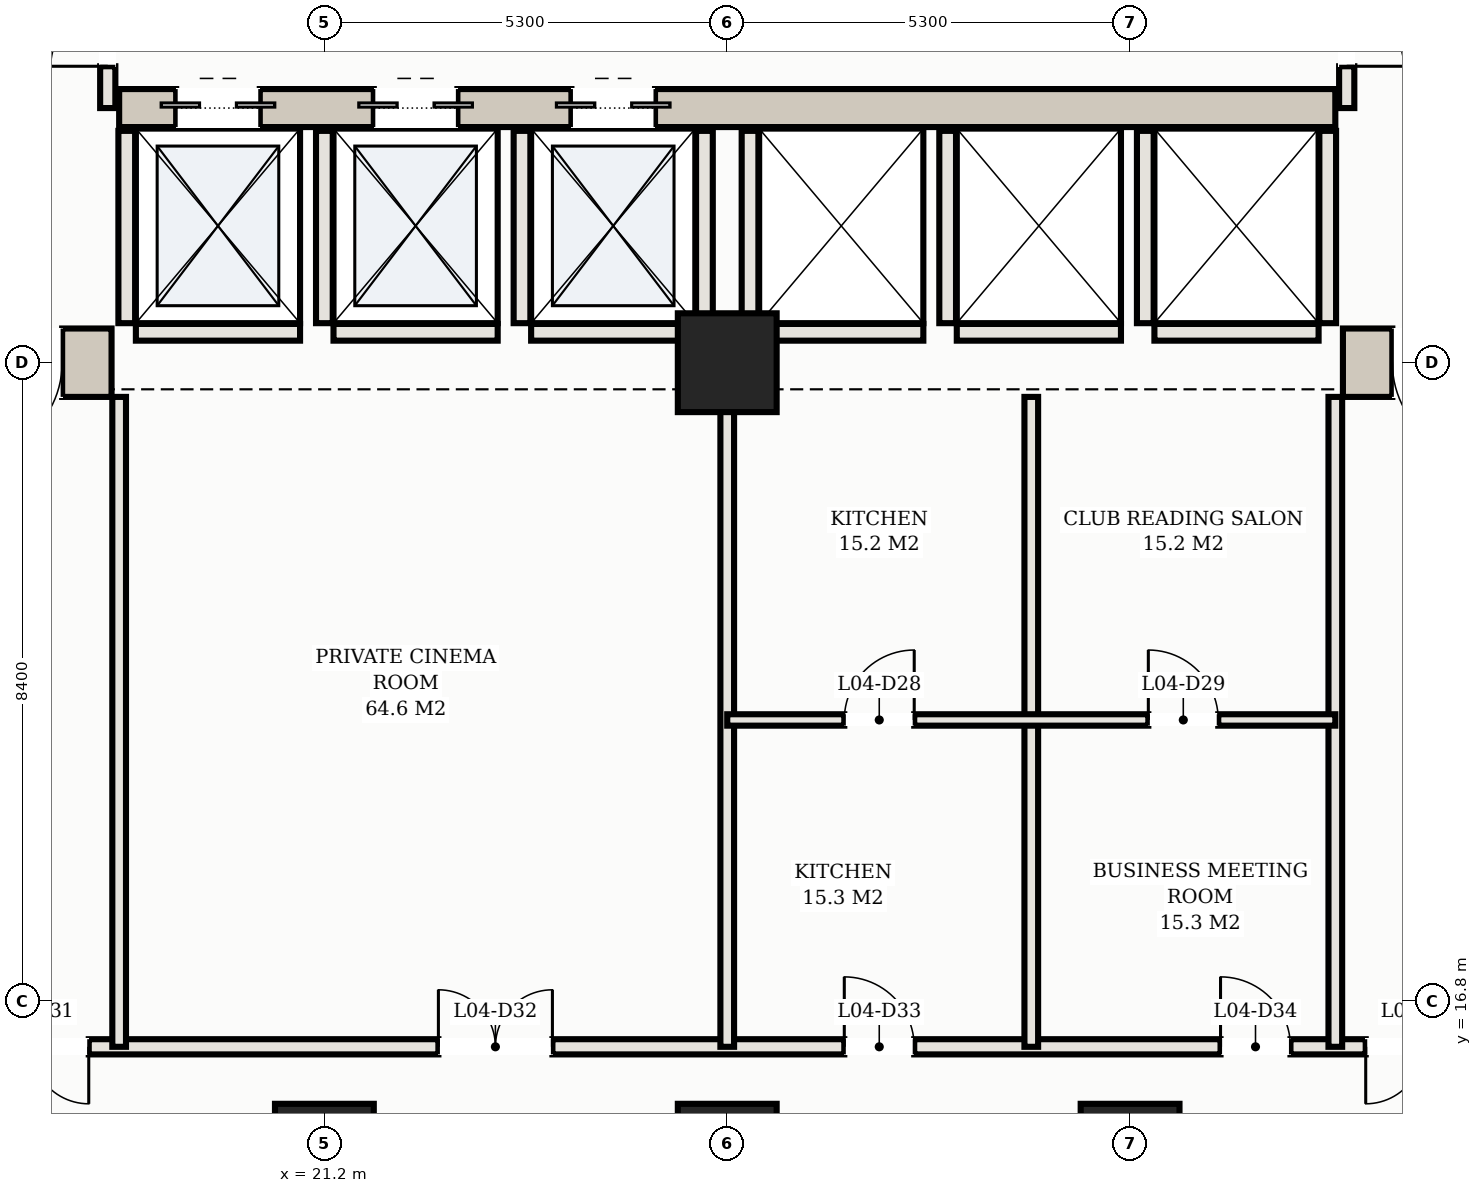
"""IFC4 building model, lengths in metres.
Left out: names, types, materials, properties, quantities, classifications, styles, units other than length and angle.
Written with IfcOpenShell. Run it as: python <this file> out.ifc"""

import sys

from ifc_helpers import new_model, si_unit, direction, frame, frame_2d, origin, origin_2d, place, context, subcontext, project, spatial, rectangle, hollow_rectangle, extrude, element, fill, save


model = new_model("IFC4")
c1 = context("Model", 3, precision=1e-05, world=origin(), true_north=direction((0.0, 1.0)))
c2 = subcontext(c1, "Body", "Model", "MODEL_VIEW")
j1 = project(units=[si_unit("LENGTHUNIT", "METRE"), si_unit("PLANEANGLEUNIT", "RADIAN")], contexts=[c1])
p1 = place(None, origin())
s1 = spatial("IfcSite", under=j1, at=p1, CompositionType="ELEMENT")
p2 = place(p1, origin())
s2 = spatial("IfcBuilding", under=s1, at=p2, CompositionType="ELEMENT")
p3 = place(p2, frame((0.0, 0.0, 19.0)))
s3 = spatial("IfcBuildingStorey", under=s2, at=p3, CompositionType="ELEMENT", Elevation=19.0)
p4 = place(p3, frame((10.15, 25.2, 0.0), z_axis=(0.0, 0.0, 1.0), x_axis=(1.0, 0.0, 0.0)))
e1 = element("IfcWall", 1, at=p4, inside=s3, PredefinedType="SHEAR", context=c2, shape_type="SweptSolid", body=[
    extrude(rectangle(XDim=8.25, YDim=0.9, at=frame_2d((4.125, 0.0))), origin(), (0.0, 0.0, 1.0), 4.86),
])
p5 = place(p4, frame((6.35, 0.0, 0.0)))
e2 = element("IfcOpeningElement", 2, at=p5, cuts=e1, PredefinedType="OPENING", context=c2, shape_type="SweptSolid", body=[
    extrude(rectangle(XDim=1.25, YDim=2.2, at=frame_2d((0.625, 1.1))), frame((0.0, 0.46, 0.0), z_axis=(0.0, -1.0, 0.0), x_axis=(1.0, 0.0, 0.0)), (0.0, 0.0, 1.0), 0.92),
])
p6 = place(p3, frame((34.6, 25.2, 0.0), z_axis=(0.0, 0.0, 1.0), x_axis=(1.0, 0.0, 0.0)))
e3 = element("IfcWall", 3, at=p6, inside=s3, PredefinedType="SHEAR", context=c2, shape_type="SweptSolid", body=[
    extrude(rectangle(XDim=8.25, YDim=0.9, at=frame_2d((4.125, 0.0))), origin(), (0.0, 0.0, 1.0), 4.86),
])
p7 = place(p6, frame((0.65, 0.0, 0.0)))
e4 = element("IfcOpeningElement", 4, at=p7, cuts=e3, PredefinedType="OPENING", context=c2, shape_type="SweptSolid", body=[
    extrude(rectangle(XDim=1.25, YDim=2.2, at=frame_2d((0.625, 1.1))), frame((0.0, 0.46, 0.0), z_axis=(0.0, -1.0, 0.0), x_axis=(1.0, 0.0, 0.0)), (0.0, 0.0, 1.0), 0.92),
])
p8 = place(p3, frame((18.5, 28.55, 0.0), z_axis=(0.0, 0.0, 1.0), x_axis=(1.0, 0.0, 0.0)))
e5 = element("IfcWall", 5, at=p8, inside=s3, PredefinedType="SHEAR", context=c2, shape_type="SweptSolid", body=[
    extrude(rectangle(XDim=16.0, YDim=0.5, at=frame_2d((8.0, 0.0))), origin(), (0.0, 0.0, 1.0), 4.86),
])
p9 = place(p8, frame((0.75, 0.0, 0.0)))
e6 = element("IfcOpeningElement", 6, at=p9, cuts=e5, PredefinedType="OPENING", context=c2, shape_type="SweptSolid", body=[
    extrude(rectangle(XDim=1.1, YDim=2.15, at=frame_2d((0.55, 1.075))), frame((0.0, 0.26, 0.0), z_axis=(0.0, -1.0, 0.0), x_axis=(1.0, 0.0, 0.0)), (0.0, 0.0, 1.0), 0.52),
])
p10 = place(p8, frame((3.35, 0.0, 0.0)))
e7 = element("IfcOpeningElement", 7, at=p10, cuts=e5, PredefinedType="OPENING", context=c2, shape_type="SweptSolid", body=[
    extrude(rectangle(XDim=1.1, YDim=2.15, at=frame_2d((0.55, 1.075))), frame((0.0, 0.26, 0.0), z_axis=(0.0, -1.0, 0.0), x_axis=(1.0, 0.0, 0.0)), (0.0, 0.0, 1.0), 0.52),
])
p11 = place(p8, frame((5.95, 0.0, 0.0)))
e8 = element("IfcOpeningElement", 8, at=p11, cuts=e5, PredefinedType="OPENING", context=c2, shape_type="SweptSolid", body=[
    extrude(rectangle(XDim=1.1, YDim=2.15, at=frame_2d((0.55, 1.075))), frame((0.0, 0.26, 0.0), z_axis=(0.0, -1.0, 0.0), x_axis=(1.0, 0.0, 0.0)), (0.0, 0.0, 1.0), 0.52),
])
for number, where, z_axis, x_axis in (
    (9, (26.5, 25.2, 0.0), (0.0, 0.0, 1.0), (1.0, 0.0, 0.0)),
    (10, (21.2, 14.8, 0.0), (0.0, 0.0, 1.0), (1.0, 0.0, 0.0)),
    (11, (26.5, 14.8, 0.0), (0.0, 0.0, 1.0), (1.0, 0.0, 0.0)),
    (12, (31.8, 14.8, 0.0), (0.0, 0.0, 1.0), (1.0, 0.0, 0.0)),
):
    element("IfcColumn", number, at=place(p3, frame(where, z_axis=z_axis, x_axis=x_axis)), inside=s3, PredefinedType="COLUMN", context=c2, shape_type="SweptSolid", body=[
        extrude(hollow_rectangle(XDim=1.3, YDim=1.3, WallThickness=0.042, at=origin_2d()), origin(), (0.0, 0.0, 1.0), 5.2),
    ])
p12 = place(p3, frame((18.6, 25.72, 0.0), z_axis=(0.0, 0.0, 1.0), x_axis=(0.0, 1.0, 0.0)))
e13 = element("IfcWall", 13, at=p12, inside=s3, PredefinedType="SOLIDWALL", context=c2, shape_type="SweptSolid", body=[
    extrude(rectangle(XDim=2.53, YDim=0.22, at=frame_2d((1.265, 0.0))), origin(), (0.0, 0.0, 1.0), 4.86),
])
p13 = place(p3, frame((18.72, 25.6, 0.0), z_axis=(0.0, 0.0, 1.0), x_axis=(1.0, 0.0, 0.0)))
e14 = element("IfcWall", 14, at=p13, inside=s3, PredefinedType="SOLIDWALL", context=c2, shape_type="SweptSolid", body=[
    extrude(rectangle(XDim=2.16, YDim=0.22, at=frame_2d((1.08, 0.0))), origin(), (0.0, 0.0, 1.0), 4.86),
])
p14 = place(p3, frame((21.2, 25.72, 0.0), z_axis=(0.0, 0.0, 1.0), x_axis=(0.0, 1.0, 0.0)))
e15 = element("IfcWall", 15, at=p14, inside=s3, PredefinedType="SOLIDWALL", context=c2, shape_type="SweptSolid", body=[
    extrude(rectangle(XDim=2.53, YDim=0.22, at=frame_2d((1.265, 0.0))), origin(), (0.0, 0.0, 1.0), 4.86),
])
p15 = place(p3, frame((21.32, 25.6, 0.0), z_axis=(0.0, 0.0, 1.0), x_axis=(1.0, 0.0, 0.0)))
e16 = element("IfcWall", 16, at=p15, inside=s3, PredefinedType="SOLIDWALL", context=c2, shape_type="SweptSolid", body=[
    extrude(rectangle(XDim=2.16, YDim=0.22, at=frame_2d((1.08, 0.0))), origin(), (0.0, 0.0, 1.0), 4.86),
])
for number, where, z_axis, x_axis in (
    (17, (23.8, 25.72, 0.0), (0.0, 0.0, 1.0), (0.0, 1.0, 0.0)),
    (18, (26.2, 25.72, 0.0), (0.0, 0.0, 1.0), (0.0, 1.0, 0.0)),
):
    element("IfcWall", number, at=place(p3, frame(where, z_axis=z_axis, x_axis=x_axis)), inside=s3, PredefinedType="SOLIDWALL", context=c2, shape_type="SweptSolid", body=[
        extrude(rectangle(XDim=2.53, YDim=0.22, at=frame_2d((1.265, 0.0))), origin(), (0.0, 0.0, 1.0), 4.86),
    ])
p16 = place(p3, frame((23.92, 25.6, 0.0), z_axis=(0.0, 0.0, 1.0), x_axis=(1.0, 0.0, 0.0)))
e19 = element("IfcWall", 19, at=p16, inside=s3, PredefinedType="SOLIDWALL", context=c2, shape_type="SweptSolid", body=[
    extrude(rectangle(XDim=2.16, YDim=0.22, at=frame_2d((1.08, 0.0))), origin(), (0.0, 0.0, 1.0), 4.86),
])
p17 = place(p3, frame((26.8, 25.72, 0.0), z_axis=(0.0, 0.0, 1.0), x_axis=(0.0, 1.0, 0.0)))
e20 = element("IfcWall", 20, at=p17, inside=s3, PredefinedType="SOLIDWALL", context=c2, shape_type="SweptSolid", body=[
    extrude(rectangle(XDim=2.53, YDim=0.22, at=frame_2d((1.265, 0.0))), origin(), (0.0, 0.0, 1.0), 4.86),
])
p18 = place(p3, frame((26.92, 25.6, 0.0), z_axis=(0.0, 0.0, 1.0), x_axis=(1.0, 0.0, 0.0)))
e21 = element("IfcWall", 21, at=p18, inside=s3, PredefinedType="SOLIDWALL", context=c2, shape_type="SweptSolid", body=[
    extrude(rectangle(XDim=2.16, YDim=0.22, at=frame_2d((1.08, 0.0))), origin(), (0.0, 0.0, 1.0), 4.86),
])
p19 = place(p3, frame((29.4, 25.72, 0.0), z_axis=(0.0, 0.0, 1.0), x_axis=(0.0, 1.0, 0.0)))
e22 = element("IfcWall", 22, at=p19, inside=s3, PredefinedType="SOLIDWALL", context=c2, shape_type="SweptSolid", body=[
    extrude(rectangle(XDim=2.53, YDim=0.22, at=frame_2d((1.265, 0.0))), origin(), (0.0, 0.0, 1.0), 4.86),
])
p20 = place(p3, frame((29.52, 25.6, 0.0), z_axis=(0.0, 0.0, 1.0), x_axis=(1.0, 0.0, 0.0)))
e23 = element("IfcWall", 23, at=p20, inside=s3, PredefinedType="SOLIDWALL", context=c2, shape_type="SweptSolid", body=[
    extrude(rectangle(XDim=2.16, YDim=0.22, at=frame_2d((1.08, 0.0))), origin(), (0.0, 0.0, 1.0), 4.86),
])
for number, where, z_axis, x_axis in (
    (24, (32.0, 25.72, 0.0), (0.0, 0.0, 1.0), (0.0, 1.0, 0.0)),
    (25, (34.4, 25.72, 0.0), (0.0, 0.0, 1.0), (0.0, 1.0, 0.0)),
):
    element("IfcWall", number, at=place(p3, frame(where, z_axis=z_axis, x_axis=x_axis)), inside=s3, PredefinedType="SOLIDWALL", context=c2, shape_type="SweptSolid", body=[
        extrude(rectangle(XDim=2.53, YDim=0.22, at=frame_2d((1.265, 0.0))), origin(), (0.0, 0.0, 1.0), 4.86),
    ])
p21 = place(p3, frame((32.12, 25.6, 0.0), z_axis=(0.0, 0.0, 1.0), x_axis=(1.0, 0.0, 0.0)))
e26 = element("IfcWall", 26, at=p21, inside=s3, PredefinedType="SOLIDWALL", context=c2, shape_type="SweptSolid", body=[
    extrude(rectangle(XDim=2.16, YDim=0.22, at=frame_2d((1.08, 0.0))), origin(), (0.0, 0.0, 1.0), 4.86),
])
p22 = place(p3, frame((18.35, 28.55, 0.0), z_axis=(0.0, 0.0, 1.0), x_axis=(0.0, 1.0, 0.0)))
e27 = element("IfcWall", 27, at=p22, inside=s3, PredefinedType="PARTITIONING", context=c2, shape_type="SweptSolid", body=[
    extrude(rectangle(XDim=2.6, YDim=0.2, at=frame_2d((1.3, 0.0))), origin(), (0.0, 0.0, 1.0), 4.86),
])
p23 = place(p22, frame((0.55, 0.0, 0.0)))
e28 = element("IfcOpeningElement", 28, at=p23, cuts=e27, PredefinedType="OPENING", context=c2, shape_type="SweptSolid", body=[
    extrude(rectangle(XDim=1.5, YDim=2.25, at=frame_2d((0.75, 1.125))), frame((0.0, 0.11, 0.0), z_axis=(0.0, -1.0, 0.0), x_axis=(1.0, 0.0, 0.0)), (0.0, 0.0, 1.0), 0.22),
])
p24 = place(p3, frame((34.65, 28.55, 0.0), z_axis=(0.0, 0.0, 1.0), x_axis=(0.0, 1.0, 0.0)))
e29 = element("IfcWall", 29, at=p24, inside=s3, PredefinedType="PARTITIONING", context=c2, shape_type="SweptSolid", body=[
    extrude(rectangle(XDim=2.6, YDim=0.2, at=frame_2d((1.3, 0.0))), origin(), (0.0, 0.0, 1.0), 4.86),
])
p25 = place(p24, frame((0.55, 0.0, 0.0)))
e30 = element("IfcOpeningElement", 30, at=p25, cuts=e29, PredefinedType="OPENING", context=c2, shape_type="SweptSolid", body=[
    extrude(rectangle(XDim=1.5, YDim=2.25, at=frame_2d((0.75, 1.125))), frame((0.0, 0.11, 0.0), z_axis=(0.0, -1.0, 0.0), x_axis=(1.0, 0.0, 0.0)), (0.0, 0.0, 1.0), 0.22),
])
p26 = place(p3, frame((-3.38, 16.2, 0.0), z_axis=(0.0, 0.0, 1.0), x_axis=(1.0, 0.0, 0.0)))
e31 = element("IfcWall", 31, at=p26, inside=s3, PredefinedType="PARTITIONING", context=c2, shape_type="SweptSolid", body=[
    extrude(rectangle(XDim=59.76, YDim=0.2, at=frame_2d((29.88, 0.0))), origin(), (0.0, 0.0, 1.0), 4.86),
])
p27 = place(p26, frame((16.12, 0.0, 0.0)))
e32 = element("IfcOpeningElement", 32, at=p27, cuts=e31, PredefinedType="OPENING", context=c2, shape_type="SweptSolid", body=[
    extrude(rectangle(XDim=0.92, YDim=2.15, at=frame_2d((0.46, 1.075))), frame((0.0, 0.11, 0.0), z_axis=(0.0, -1.0, 0.0), x_axis=(1.0, 0.0, 0.0)), (0.0, 0.0, 1.0), 0.22),
])
p28 = place(p26, frame((19.98, 0.0, 0.0)))
e33 = element("IfcOpeningElement", 33, at=p28, cuts=e31, PredefinedType="OPENING", context=c2, shape_type="SweptSolid", body=[
    extrude(rectangle(XDim=1.5, YDim=2.25, at=frame_2d((0.75, 1.125))), frame((0.0, 0.11, 0.0), z_axis=(0.0, -1.0, 0.0), x_axis=(1.0, 0.0, 0.0)), (0.0, 0.0, 1.0), 0.22),
])
p29 = place(p26, frame((26.08, 0.0, 0.0)))
e34 = element("IfcOpeningElement", 34, at=p29, cuts=e31, PredefinedType="OPENING", context=c2, shape_type="SweptSolid", body=[
    extrude(rectangle(XDim=1.5, YDim=2.25, at=frame_2d((0.75, 1.125))), frame((0.0, 0.11, 0.0), z_axis=(0.0, -1.0, 0.0), x_axis=(1.0, 0.0, 0.0)), (0.0, 0.0, 1.0), 0.22),
])
p30 = place(p26, frame((31.42, 0.0, 0.0)))
e35 = element("IfcOpeningElement", 35, at=p30, cuts=e31, PredefinedType="OPENING", context=c2, shape_type="SweptSolid", body=[
    extrude(rectangle(XDim=0.92, YDim=2.15, at=frame_2d((0.46, 1.075))), frame((0.0, 0.11, 0.0), z_axis=(0.0, -1.0, 0.0), x_axis=(1.0, 0.0, 0.0)), (0.0, 0.0, 1.0), 0.22),
])
p31 = place(p26, frame((36.37, 0.0, 0.0)))
e36 = element("IfcOpeningElement", 36, at=p31, cuts=e31, PredefinedType="OPENING", context=c2, shape_type="SweptSolid", body=[
    extrude(rectangle(XDim=0.92, YDim=2.15, at=frame_2d((0.46, 1.075))), frame((0.0, 0.11, 0.0), z_axis=(0.0, -1.0, 0.0), x_axis=(1.0, 0.0, 0.0)), (0.0, 0.0, 1.0), 0.22),
])
p32 = place(p26, frame((38.28, 0.0, 0.0)))
e37 = element("IfcOpeningElement", 37, at=p32, cuts=e31, PredefinedType="OPENING", context=c2, shape_type="SweptSolid", body=[
    extrude(rectangle(XDim=1.5, YDim=2.25, at=frame_2d((0.75, 1.125))), frame((0.0, 0.11, 0.0), z_axis=(0.0, -1.0, 0.0), x_axis=(1.0, 0.0, 0.0)), (0.0, 0.0, 1.0), 0.22),
])
p33 = place(p26, frame((42.93, 0.0, 0.0)))
e38 = element("IfcOpeningElement", 38, at=p33, cuts=e31, PredefinedType="OPENING", context=c2, shape_type="SweptSolid", body=[
    extrude(rectangle(XDim=1.5, YDim=2.25, at=frame_2d((0.75, 1.125))), frame((0.0, 0.11, 0.0), z_axis=(0.0, -1.0, 0.0), x_axis=(1.0, 0.0, 0.0)), (0.0, 0.0, 1.0), 0.22),
])
p34 = place(p26, frame((4.44, 0.0, 0.0)))
e39 = element("IfcOpeningElement", 39, at=p34, cuts=e31, PredefinedType="OPENING", context=c2, shape_type="SweptSolid", body=[
    extrude(rectangle(XDim=1.5, YDim=2.25, at=frame_2d((0.75, 1.125))), frame((0.0, 0.11, 0.0), z_axis=(0.0, -1.0, 0.0), x_axis=(1.0, 0.0, 0.0)), (0.0, 0.0, 1.0), 0.22),
])
for number, where, z_axis, x_axis in (
    (40, (18.5, 16.2, 0.0), (0.0, 0.0, 1.0), (0.0, 1.0, 0.0)),
    (41, (26.5, 16.2, 0.0), (0.0, 0.0, 1.0), (0.0, 1.0, 0.0)),
    (42, (30.5, 16.2, 0.0), (0.0, 0.0, 1.0), (0.0, 1.0, 0.0)),
    (43, (34.5, 16.2, 0.0), (0.0, 0.0, 1.0), (0.0, 1.0, 0.0)),
):
    element("IfcWall", number, at=place(p3, frame(where, z_axis=z_axis, x_axis=x_axis)), inside=s3, PredefinedType="PARTITIONING", context=c2, shape_type="SweptSolid", body=[
        extrude(rectangle(XDim=8.55, YDim=0.18, at=frame_2d((4.275, 0.0))), origin(), (0.0, 0.0, 1.0), 4.86),
    ])
p35 = place(p3, frame((26.5, 20.5, 0.0), z_axis=(0.0, 0.0, 1.0), x_axis=(1.0, 0.0, 0.0)))
e44 = element("IfcWall", 44, at=p35, inside=s3, PredefinedType="PARTITIONING", context=c2, shape_type="SweptSolid", body=[
    extrude(rectangle(XDim=8.0, YDim=0.15, at=frame_2d((4.0, 0.0))), origin(), (0.0, 0.0, 1.0), 4.86),
])
p36 = place(p35, frame((1.54, 0.0, 0.0)))
e45 = element("IfcOpeningElement", 45, at=p36, cuts=e44, PredefinedType="OPENING", context=c2, shape_type="SweptSolid", body=[
    extrude(rectangle(XDim=0.92, YDim=2.15, at=frame_2d((0.46, 1.075))), frame((0.0, 0.085, 0.0), z_axis=(0.0, -1.0, 0.0), x_axis=(1.0, 0.0, 0.0)), (0.0, 0.0, 1.0), 0.17),
])
p37 = place(p35, frame((5.54, 0.0, 0.0)))
e46 = element("IfcOpeningElement", 46, at=p37, cuts=e44, PredefinedType="OPENING", context=c2, shape_type="SweptSolid", body=[
    extrude(rectangle(XDim=0.92, YDim=2.15, at=frame_2d((0.46, 1.075))), frame((0.0, 0.085, 0.0), z_axis=(0.0, -1.0, 0.0), x_axis=(1.0, 0.0, 0.0)), (0.0, 0.0, 1.0), 0.17),
])
p38 = place(p9, origin())
e47 = element("IfcDoor", 47, at=p38, inside=s3, OperationType="DOUBLE_DOOR_SLIDING", PredefinedType="DOOR", context=c2, shape_type="SweptSolid", body=[
    extrude(rectangle(XDim=1.1, YDim=2.15, at=frame_2d((0.55, 1.075))), frame((0.0, 0.025, 0.0), z_axis=(0.0, -1.0, 0.0), x_axis=(1.0, 0.0, 0.0)), (0.0, 0.0, 1.0), 0.05),
])
fill(e6, e47)
p39 = place(p10, origin())
e48 = element("IfcDoor", 48, at=p39, inside=s3, OperationType="DOUBLE_DOOR_SLIDING", PredefinedType="DOOR", context=c2, shape_type="SweptSolid", body=[
    extrude(rectangle(XDim=1.1, YDim=2.15, at=frame_2d((0.55, 1.075))), frame((0.0, 0.025, 0.0), z_axis=(0.0, -1.0, 0.0), x_axis=(1.0, 0.0, 0.0)), (0.0, 0.0, 1.0), 0.05),
])
fill(e7, e48)
p40 = place(p11, origin())
e49 = element("IfcDoor", 49, at=p40, inside=s3, OperationType="DOUBLE_DOOR_SLIDING", PredefinedType="DOOR", context=c2, shape_type="SweptSolid", body=[
    extrude(rectangle(XDim=1.1, YDim=2.15, at=frame_2d((0.55, 1.075))), frame((0.0, 0.025, 0.0), z_axis=(0.0, -1.0, 0.0), x_axis=(1.0, 0.0, 0.0)), (0.0, 0.0, 1.0), 0.05),
])
fill(e8, e49)
p41 = place(p5, frame((1.25, 0.0, 0.0), z_axis=(0.0, 0.0, 1.0), x_axis=(-1.0, 0.0, 0.0)))
e50 = element("IfcDoor", 50, at=p41, inside=s3, OperationType="SINGLE_SWING_RIGHT", PredefinedType="DOOR", context=c2, shape_type="SweptSolid", body=[
    extrude(rectangle(XDim=1.25, YDim=2.2, at=frame_2d((0.625, 1.1))), frame((0.0, 0.025, 0.0), z_axis=(0.0, -1.0, 0.0), x_axis=(1.0, 0.0, 0.0)), (0.0, 0.0, 1.0), 0.05),
])
fill(e2, e50)
p42 = place(p7, frame((1.25, 0.0, 0.0), z_axis=(0.0, 0.0, 1.0), x_axis=(-1.0, 0.0, 0.0)))
e51 = element("IfcDoor", 51, at=p42, inside=s3, OperationType="SINGLE_SWING_LEFT", PredefinedType="DOOR", context=c2, shape_type="SweptSolid", body=[
    extrude(rectangle(XDim=1.25, YDim=2.2, at=frame_2d((0.625, 1.1))), frame((0.0, 0.025, 0.0), z_axis=(0.0, -1.0, 0.0), x_axis=(1.0, 0.0, 0.0)), (0.0, 0.0, 1.0), 0.05),
])
fill(e4, e51)
p43 = place(p23, origin())
e52 = element("IfcDoor", 52, at=p43, inside=s3, OperationType="DOUBLE_DOOR_SINGLE_SWING", PredefinedType="DOOR", context=c2, shape_type="SweptSolid", body=[
    extrude(rectangle(XDim=1.5, YDim=2.25, at=frame_2d((0.75, 1.125))), frame((0.0, 0.025, 0.0), z_axis=(0.0, -1.0, 0.0), x_axis=(1.0, 0.0, 0.0)), (0.0, 0.0, 1.0), 0.05),
])
fill(e28, e52)
p44 = place(p25, frame((1.5, 0.0, 0.0), z_axis=(0.0, 0.0, 1.0), x_axis=(-1.0, 0.0, 0.0)))
e53 = element("IfcDoor", 53, at=p44, inside=s3, OperationType="DOUBLE_DOOR_SINGLE_SWING", PredefinedType="DOOR", context=c2, shape_type="SweptSolid", body=[
    extrude(rectangle(XDim=1.5, YDim=2.25, at=frame_2d((0.75, 1.125))), frame((0.0, 0.025, 0.0), z_axis=(0.0, -1.0, 0.0), x_axis=(1.0, 0.0, 0.0)), (0.0, 0.0, 1.0), 0.05),
])
fill(e30, e53)
p45 = place(p36, origin())
e54 = element("IfcDoor", 54, at=p45, inside=s3, OperationType="SINGLE_SWING_RIGHT", PredefinedType="DOOR", context=c2, shape_type="SweptSolid", body=[
    extrude(rectangle(XDim=0.92, YDim=2.15, at=frame_2d((0.46, 1.075))), frame((0.0, 0.025, 0.0), z_axis=(0.0, -1.0, 0.0), x_axis=(1.0, 0.0, 0.0)), (0.0, 0.0, 1.0), 0.05),
])
fill(e45, e54)
p46 = place(p37, origin())
e55 = element("IfcDoor", 55, at=p46, inside=s3, OperationType="SINGLE_SWING_LEFT", PredefinedType="DOOR", context=c2, shape_type="SweptSolid", body=[
    extrude(rectangle(XDim=0.92, YDim=2.15, at=frame_2d((0.46, 1.075))), frame((0.0, 0.025, 0.0), z_axis=(0.0, -1.0, 0.0), x_axis=(1.0, 0.0, 0.0)), (0.0, 0.0, 1.0), 0.05),
])
fill(e46, e55)
p47 = place(p28, frame((1.5, 0.0, 0.0), z_axis=(0.0, 0.0, 1.0), x_axis=(-1.0, 0.0, 0.0)))
e56 = element("IfcDoor", 56, at=p47, inside=s3, OperationType="DOUBLE_DOOR_SINGLE_SWING", PredefinedType="DOOR", context=c2, shape_type="SweptSolid", body=[
    extrude(rectangle(XDim=1.5, YDim=2.25, at=frame_2d((0.75, 1.125))), frame((0.0, 0.025, 0.0), z_axis=(0.0, -1.0, 0.0), x_axis=(1.0, 0.0, 0.0)), (0.0, 0.0, 1.0), 0.05),
])
fill(e33, e56)
p48 = place(p29, origin())
e57 = element("IfcDoor", 57, at=p48, inside=s3, OperationType="DOUBLE_DOOR_SINGLE_SWING", PredefinedType="DOOR", context=c2, shape_type="SweptSolid", body=[
    extrude(rectangle(XDim=1.5, YDim=2.25, at=frame_2d((0.75, 1.125))), frame((0.0, 0.025, 0.0), z_axis=(0.0, -1.0, 0.0), x_axis=(1.0, 0.0, 0.0)), (0.0, 0.0, 1.0), 0.05),
])
fill(e34, e57)
p49 = place(p30, origin())
e58 = element("IfcDoor", 58, at=p49, inside=s3, OperationType="SINGLE_SWING_LEFT", PredefinedType="DOOR", context=c2, shape_type="SweptSolid", body=[
    extrude(rectangle(XDim=0.92, YDim=2.15, at=frame_2d((0.46, 1.075))), frame((0.0, 0.025, 0.0), z_axis=(0.0, -1.0, 0.0), x_axis=(1.0, 0.0, 0.0)), (0.0, 0.0, 1.0), 0.05),
])
fill(e35, e58)
p50 = place(p31, origin())
e59 = element("IfcDoor", 59, at=p50, inside=s3, OperationType="SINGLE_SWING_LEFT", PredefinedType="DOOR", context=c2, shape_type="SweptSolid", body=[
    extrude(rectangle(XDim=0.92, YDim=2.15, at=frame_2d((0.46, 1.075))), frame((0.0, 0.025, 0.0), z_axis=(0.0, -1.0, 0.0), x_axis=(1.0, 0.0, 0.0)), (0.0, 0.0, 1.0), 0.05),
])
fill(e36, e59)
p51 = place(p32, frame((1.5, 0.0, 0.0), z_axis=(0.0, 0.0, 1.0), x_axis=(-1.0, 0.0, 0.0)))
e60 = element("IfcDoor", 60, at=p51, inside=s3, OperationType="DOUBLE_DOOR_SINGLE_SWING", PredefinedType="DOOR", context=c2, shape_type="SweptSolid", body=[
    extrude(rectangle(XDim=1.5, YDim=2.25, at=frame_2d((0.75, 1.125))), frame((0.0, 0.025, 0.0), z_axis=(0.0, -1.0, 0.0), x_axis=(1.0, 0.0, 0.0)), (0.0, 0.0, 1.0), 0.05),
])
fill(e37, e60)
save(model, sys.argv[1])
